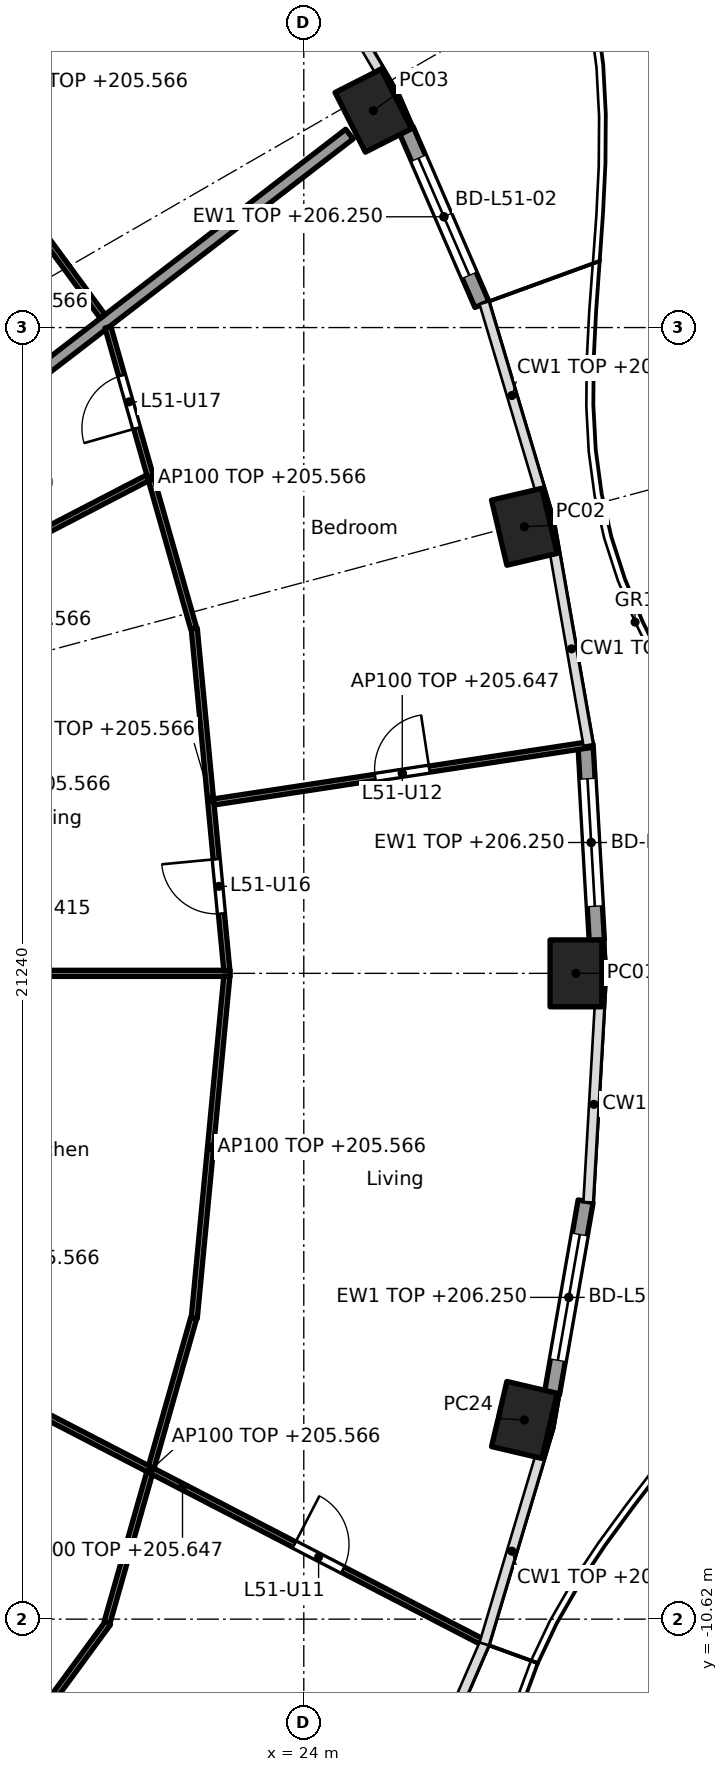
"""IFC4 building model, lengths in metres.
Left out: names, types, materials, properties, quantities, classifications, styles, units other than length and angle.
Written with IfcOpenShell. Run it as: python <this file> out.ifc"""

import sys

from ifc_helpers import new_model, si_unit, direction, frame, frame_2d, origin, origin_2d, place, context, subcontext, project, spatial, rectangle, hollow_rectangle, extrude, element, fill, save


model = new_model("IFC4")
c1 = context("Model", 3, precision=1e-05, world=origin(), true_north=direction((0.0, 1.0)))
c2 = subcontext(c1, "Body", "Model", "MODEL_VIEW")
j1 = project(units=[si_unit("LENGTHUNIT", "METRE"), si_unit("PLANEANGLEUNIT", "RADIAN")], contexts=[c1])
p1 = place(None, origin())
s1 = spatial("IfcSite", under=j1, at=p1, CompositionType="ELEMENT")
p2 = place(p1, origin())
s2 = spatial("IfcBuilding", under=s1, at=p2, CompositionType="ELEMENT")
p3 = place(p2, frame((0.0, 0.0, 202.9)))
s3 = spatial("IfcBuildingStorey", under=s2, at=p3, CompositionType="ELEMENT", Elevation=202.9)
for number, where, z_axis, x_axis in (
    (1, (28.475, 0.0, 0.0), (0.0, 0.0, 1.0), (0.0, 1.0, 0.0)),
    (2, (27.627, 7.344, 0.0), (0.0, 0.0, 1.0), (-0.229, 0.973, 0.0)),
    (3, (25.142, 14.188, 0.0), (0.0, 0.0, 1.0), (-0.452, 0.892, 0.0)),
    (4, (27.627, -7.344, 0.0), (0.0, 0.0, 1.0), (0.229, 0.973, 0.0)),
):
    element("IfcColumn", number, at=place(p3, frame(where, z_axis=z_axis, x_axis=x_axis)), inside=s3, PredefinedType="COLUMN", context=c2, shape_type="SweptSolid", body=[
        extrude(hollow_rectangle(XDim=1.1, YDim=0.85, WallThickness=0.036, at=origin_2d()), origin(), (0.0, 0.0, 1.0), 3.7),
    ])
p4 = place(p3, frame((28.633, 3.762, 0.0), z_axis=(0.0, 0.0, 1.0), x_axis=(0.057532692854, -0.998343622834, 0.0)))
e5 = element("IfcWall", 5, at=p4, inside=s3, PredefinedType="SOLIDWALL", context=c2, shape_type="SweptSolid", body=[
    extrude(rectangle(XDim=3.225, YDim=0.25, at=frame_2d((1.613, 0.0))), origin(), (0.0, 0.0, 1.0), 3.35),
])
p5 = place(p4, frame((0.562, 0.0, 0.0)))
e6 = element("IfcOpeningElement", 6, at=p5, cuts=e5, PredefinedType="OPENING", context=c2, shape_type="SweptSolid", body=[
    extrude(rectangle(XDim=2.1, YDim=2.4, at=frame_2d((1.05, 1.2))), frame((0.0, 0.135, 0.0), z_axis=(0.0, -1.0, 0.0), x_axis=(1.0, 0.0, 0.0)), (0.0, 0.0, 1.0), 0.27),
])
p6 = place(p3, frame((25.679, 13.883, 0.0), z_axis=(0.0, 0.0, 1.0), x_axis=(0.397620521824, -0.917549955384, 0.0)))
e7 = element("IfcWall", 7, at=p6, inside=s3, PredefinedType="SOLIDWALL", context=c2, shape_type="SweptSolid", body=[
    extrude(rectangle(XDim=3.142, YDim=0.25, at=frame_2d((1.571, 0.0))), origin(), (0.0, 0.0, 1.0), 3.35),
])
p7 = place(p6, frame((0.521, 0.0, 0.0)))
e8 = element("IfcOpeningElement", 8, at=p7, cuts=e7, PredefinedType="OPENING", context=c2, shape_type="SweptSolid", body=[
    extrude(rectangle(XDim=2.1, YDim=2.4, at=frame_2d((1.05, 1.2))), frame((0.0, 0.135, 0.0), z_axis=(0.0, -1.0, 0.0), x_axis=(1.0, 0.0, 0.0)), (0.0, 0.0, 1.0), 0.27),
])
p8 = place(p3, frame((28.635, -3.747, 0.0), z_axis=(0.0, 0.0, 1.0), x_axis=(-0.172149769468, -0.985070787747, 0.0)))
e9 = element("IfcWall", 9, at=p8, inside=s3, PredefinedType="SOLIDWALL", context=c2, shape_type="SweptSolid", body=[
    extrude(rectangle(XDim=3.211, YDim=0.25, at=frame_2d((1.605, 0.0))), origin(), (0.0, 0.0, 1.0), 3.35),
])
p9 = place(p8, frame((0.555, 0.0, 0.0)))
e10 = element("IfcOpeningElement", 10, at=p9, cuts=e9, PredefinedType="OPENING", context=c2, shape_type="SweptSolid", body=[
    extrude(rectangle(XDim=2.1, YDim=2.4, at=frame_2d((1.05, 1.2))), frame((0.0, 0.135, 0.0), z_axis=(0.0, -1.0, 0.0), x_axis=(1.0, 0.0, 0.0)), (0.0, 0.0, 1.0), 0.27),
])
p10 = place(p3, frame((14.822, 6.154, 0.0), z_axis=(0.0, 0.0, 1.0), x_axis=(0.792203056092, 0.610257583254, 0.0)))
e11 = element("IfcWall", 11, at=p10, inside=s3, PredefinedType="PARTITIONING", context=c2, shape_type="SweptSolid", body=[
    extrude(rectangle(XDim=12.533, YDim=0.2, at=frame_2d((6.266, 0.0))), origin(), (0.0, 0.0, 1.0), 2.666),
])
p11 = place(p3, frame((12.665, 0.0, 0.0), z_axis=(0.0, 0.0, 1.0), x_axis=(1.0, 0.0, 0.0)))
e12 = element("IfcWall", 12, at=p11, inside=s3, PredefinedType="PARTITIONING", context=c2, shape_type="SweptSolid", body=[
    extrude(rectangle(XDim=10.124, YDim=0.1, at=frame_2d((5.062, 0.0))), origin(), (0.0, 0.0, 1.0), 2.515),
])
p12 = place(p3, frame((22.734, 0.05, 0.0), z_axis=(0.0, 0.0, 1.0), x_axis=(-0.0949274088, 0.995484197292, 0.0)))
e13 = element("IfcWall", 13, at=p12, inside=s3, PredefinedType="PARTITIONING", context=c2, shape_type="SweptSolid", body=[
    extrude(rectangle(XDim=5.648, YDim=0.1, at=frame_2d((2.824, 0.0))), origin(), (0.0, 0.0, 1.0), 2.666),
])
p13 = place(p12, frame((0.937, 0.0, 0.0)))
e14 = element("IfcOpeningElement", 14, at=p13, cuts=e13, PredefinedType="OPENING", context=c2, shape_type="SweptSolid", body=[
    extrude(rectangle(XDim=0.9, YDim=2.1, at=frame_2d((0.45, 1.05))), frame((0.0, 0.06, 0.0), z_axis=(0.0, -1.0, 0.0), x_axis=(1.0, 0.0, 0.0)), (0.0, 0.0, 1.0), 0.12),
])
p14 = place(p3, frame((22.734, -0.05, 0.0), z_axis=(0.0, 0.0, 1.0), x_axis=(-0.0949274088, -0.995484197292, 0.0)))
e15 = element("IfcWall", 15, at=p14, inside=s3, PredefinedType="PARTITIONING", context=c2, shape_type="SweptSolid", body=[
    extrude(rectangle(XDim=5.648, YDim=0.1, at=frame_2d((2.824, 0.0))), origin(), (0.0, 0.0, 1.0), 2.666),
])
p15 = place(p3, frame((22.521, 2.819, 0.0), z_axis=(0.0, 0.0, 1.0), x_axis=(0.988590363863, 0.150628989499, 0.0)))
e16 = element("IfcWall", 16, at=p15, inside=s3, PredefinedType="PARTITIONING", context=c2, shape_type="SweptSolid", body=[
    extrude(rectangle(XDim=6.269, YDim=0.1, at=frame_2d((3.135, 0.0))), origin(), (0.0, 0.0, 1.0), 2.747),
])
p16 = place(p15, frame((2.685, 0.0, 0.0)))
e17 = element("IfcOpeningElement", 17, at=p16, cuts=e16, PredefinedType="OPENING", context=c2, shape_type="SweptSolid", body=[
    extrude(rectangle(XDim=0.9, YDim=2.1, at=frame_2d((0.45, 1.05))), frame((0.0, 0.06, 0.0), z_axis=(0.0, -1.0, 0.0), x_axis=(1.0, 0.0, 0.0)), (0.0, 0.0, 1.0), 0.12),
])
p17 = place(p3, frame((22.189, 5.67, 0.0), z_axis=(0.0, 0.0, 1.0), x_axis=(-0.273819702124, 0.961781040949, 0.0)))
e18 = element("IfcWall", 18, at=p17, inside=s3, PredefinedType="PARTITIONING", context=c2, shape_type="SweptSolid", body=[
    extrude(rectangle(XDim=5.152, YDim=0.1, at=frame_2d((2.576, 0.0))), origin(), (0.0, 0.0, 1.0), 2.666),
])
p18 = place(p17, frame((3.426, 0.0, 0.0)))
e19 = element("IfcOpeningElement", 19, at=p18, cuts=e18, PredefinedType="OPENING", context=c2, shape_type="SweptSolid", body=[
    extrude(rectangle(XDim=0.9, YDim=2.1, at=frame_2d((0.45, 1.05))), frame((0.0, 0.06, 0.0), z_axis=(0.0, -1.0, 0.0), x_axis=(1.0, 0.0, 0.0)), (0.0, 0.0, 1.0), 0.12),
])
p19 = place(p3, frame((17.003, 5.851, 0.0), z_axis=(0.0, 0.0, 1.0), x_axis=(0.887654549419, 0.460509935719, 0.0)))
e20 = element("IfcWall", 20, at=p19, inside=s3, PredefinedType="PARTITIONING", context=c2, shape_type="SweptSolid", body=[
    extrude(rectangle(XDim=4.99, YDim=0.1, at=frame_2d((2.495, 0.0))), origin(), (0.0, 0.0, 1.0), 3.35),
])
p20 = place(p3, frame((20.692, 10.802, 0.0), z_axis=(0.0, 0.0, 1.0), x_axis=(-0.591122127251, 0.806582066918, 0.0)))
e21 = element("IfcWall", 21, at=p20, inside=s3, PredefinedType="PARTITIONING", context=c2, shape_type="SweptSolid", body=[
    extrude(rectangle(XDim=5.96, YDim=0.1, at=frame_2d((2.98, 0.0))), origin(), (0.0, 0.0, 1.0), 2.666),
])
p21 = place(p20, frame((2.505, 0.0, 0.0)))
e22 = element("IfcOpeningElement", 22, at=p21, cuts=e21, PredefinedType="OPENING", context=c2, shape_type="SweptSolid", body=[
    extrude(rectangle(XDim=0.9, YDim=2.1, at=frame_2d((0.45, 1.05))), frame((0.0, 0.06, 0.0), z_axis=(0.0, -1.0, 0.0), x_axis=(1.0, 0.0, 0.0)), (0.0, 0.0, 1.0), 0.12),
])
p22 = place(p3, frame((17.229, -15.529, 0.0), z_axis=(0.0, 0.0, 1.0), x_axis=(0.591117075283, 0.806585769345, 0.0)))
e23 = element("IfcWall", 23, at=p22, inside=s3, PredefinedType="PARTITIONING", context=c2, shape_type="SweptSolid", body=[
    extrude(rectangle(XDim=6.01, YDim=0.1, at=frame_2d((3.005, 0.0))), origin(), (0.0, 0.0, 1.0), 2.666),
])
p23 = place(p3, frame((20.765, -10.673, 0.0), z_axis=(0.0, 0.0, 1.0), x_axis=(0.273815967041, 0.961782104322, 0.0)))
e24 = element("IfcWall", 24, at=p23, inside=s3, PredefinedType="PARTITIONING", context=c2, shape_type="SweptSolid", body=[
    extrude(rectangle(XDim=5.202, YDim=0.1, at=frame_2d((2.601, 0.0))), origin(), (0.0, 0.0, 1.0), 2.666),
])
p24 = place(p3, frame((17.003, -5.851, 0.0), z_axis=(0.0, 0.0, 1.0), x_axis=(0.888005628038, -0.4598325832, 0.0)))
e25 = element("IfcWall", 25, at=p24, inside=s3, PredefinedType="PARTITIONING", context=c2, shape_type="SweptSolid", body=[
    extrude(rectangle(XDim=11.266, YDim=0.1, at=frame_2d((5.633, 0.0))), origin(), (0.0, 0.0, 1.0), 2.747),
])
p25 = place(p24, frame((7.703, 0.0, 0.0)))
e26 = element("IfcOpeningElement", 26, at=p25, cuts=e25, PredefinedType="OPENING", context=c2, shape_type="SweptSolid", body=[
    extrude(rectangle(XDim=0.9, YDim=2.1, at=frame_2d((0.45, 1.05))), frame((0.0, 0.06, 0.0), z_axis=(0.0, -1.0, 0.0), x_axis=(1.0, 0.0, 0.0)), (0.0, 0.0, 1.0), 0.12),
])
p26 = place(p24, frame((2.07, 0.0, 0.0)))
e27 = element("IfcOpeningElement", 27, at=p26, cuts=e25, PredefinedType="OPENING", context=c2, shape_type="SweptSolid", body=[
    extrude(rectangle(XDim=0.9, YDim=2.1, at=frame_2d((0.45, 1.05))), frame((0.0, 0.06, 0.0), z_axis=(0.0, -1.0, 0.0), x_axis=(1.0, 0.0, 0.0)), (0.0, 0.0, 1.0), 0.12),
])
p27 = place(p5, origin())
e28 = element("IfcDoor", 28, at=p27, inside=s3, OperationType="SLIDING_TO_LEFT", PredefinedType="DOOR", context=c2, shape_type="SweptSolid", body=[
    extrude(rectangle(XDim=2.1, YDim=2.4, at=frame_2d((1.05, 1.2))), frame((0.0, 0.025, 0.0), z_axis=(0.0, -1.0, 0.0), x_axis=(1.0, 0.0, 0.0)), (0.0, 0.0, 1.0), 0.05),
])
fill(e6, e28)
p28 = place(p7, origin())
e29 = element("IfcDoor", 29, at=p28, inside=s3, OperationType="SLIDING_TO_LEFT", PredefinedType="DOOR", context=c2, shape_type="SweptSolid", body=[
    extrude(rectangle(XDim=2.1, YDim=2.4, at=frame_2d((1.05, 1.2))), frame((0.0, 0.025, 0.0), z_axis=(0.0, -1.0, 0.0), x_axis=(1.0, 0.0, 0.0)), (0.0, 0.0, 1.0), 0.05),
])
fill(e8, e29)
p29 = place(p9, origin())
e30 = element("IfcDoor", 30, at=p29, inside=s3, OperationType="SLIDING_TO_LEFT", PredefinedType="DOOR", context=c2, shape_type="SweptSolid", body=[
    extrude(rectangle(XDim=2.1, YDim=2.4, at=frame_2d((1.05, 1.2))), frame((0.0, 0.025, 0.0), z_axis=(0.0, -1.0, 0.0), x_axis=(1.0, 0.0, 0.0)), (0.0, 0.0, 1.0), 0.05),
])
fill(e10, e30)
p30 = place(p25, origin())
e31 = element("IfcDoor", 31, at=p30, inside=s3, OperationType="SINGLE_SWING_LEFT", PredefinedType="DOOR", context=c2, shape_type="SweptSolid", body=[
    extrude(rectangle(XDim=0.9, YDim=2.1, at=frame_2d((0.45, 1.05))), frame((0.0, 0.025, 0.0), z_axis=(0.0, -1.0, 0.0), x_axis=(1.0, 0.0, 0.0)), (0.0, 0.0, 1.0), 0.05),
])
fill(e26, e31)
p31 = place(p16, origin())
e32 = element("IfcDoor", 32, at=p31, inside=s3, OperationType="SINGLE_SWING_RIGHT", PredefinedType="DOOR", context=c2, shape_type="SweptSolid", body=[
    extrude(rectangle(XDim=0.9, YDim=2.1, at=frame_2d((0.45, 1.05))), frame((0.0, 0.025, 0.0), z_axis=(0.0, -1.0, 0.0), x_axis=(1.0, 0.0, 0.0)), (0.0, 0.0, 1.0), 0.05),
])
fill(e17, e32)
p32 = place(p13, origin())
e33 = element("IfcDoor", 33, at=p32, inside=s3, OperationType="SINGLE_SWING_RIGHT", PredefinedType="DOOR", context=c2, shape_type="SweptSolid", body=[
    extrude(rectangle(XDim=0.9, YDim=2.1, at=frame_2d((0.45, 1.05))), frame((0.0, 0.025, 0.0), z_axis=(0.0, -1.0, 0.0), x_axis=(1.0, 0.0, 0.0)), (0.0, 0.0, 1.0), 0.05),
])
fill(e14, e33)
p33 = place(p18, origin())
e34 = element("IfcDoor", 34, at=p33, inside=s3, OperationType="SINGLE_SWING_LEFT", PredefinedType="DOOR", context=c2, shape_type="SweptSolid", body=[
    extrude(rectangle(XDim=0.9, YDim=2.1, at=frame_2d((0.45, 1.05))), frame((0.0, 0.025, 0.0), z_axis=(0.0, -1.0, 0.0), x_axis=(1.0, 0.0, 0.0)), (0.0, 0.0, 1.0), 0.05),
])
fill(e19, e34)
save(model, sys.argv[1])
